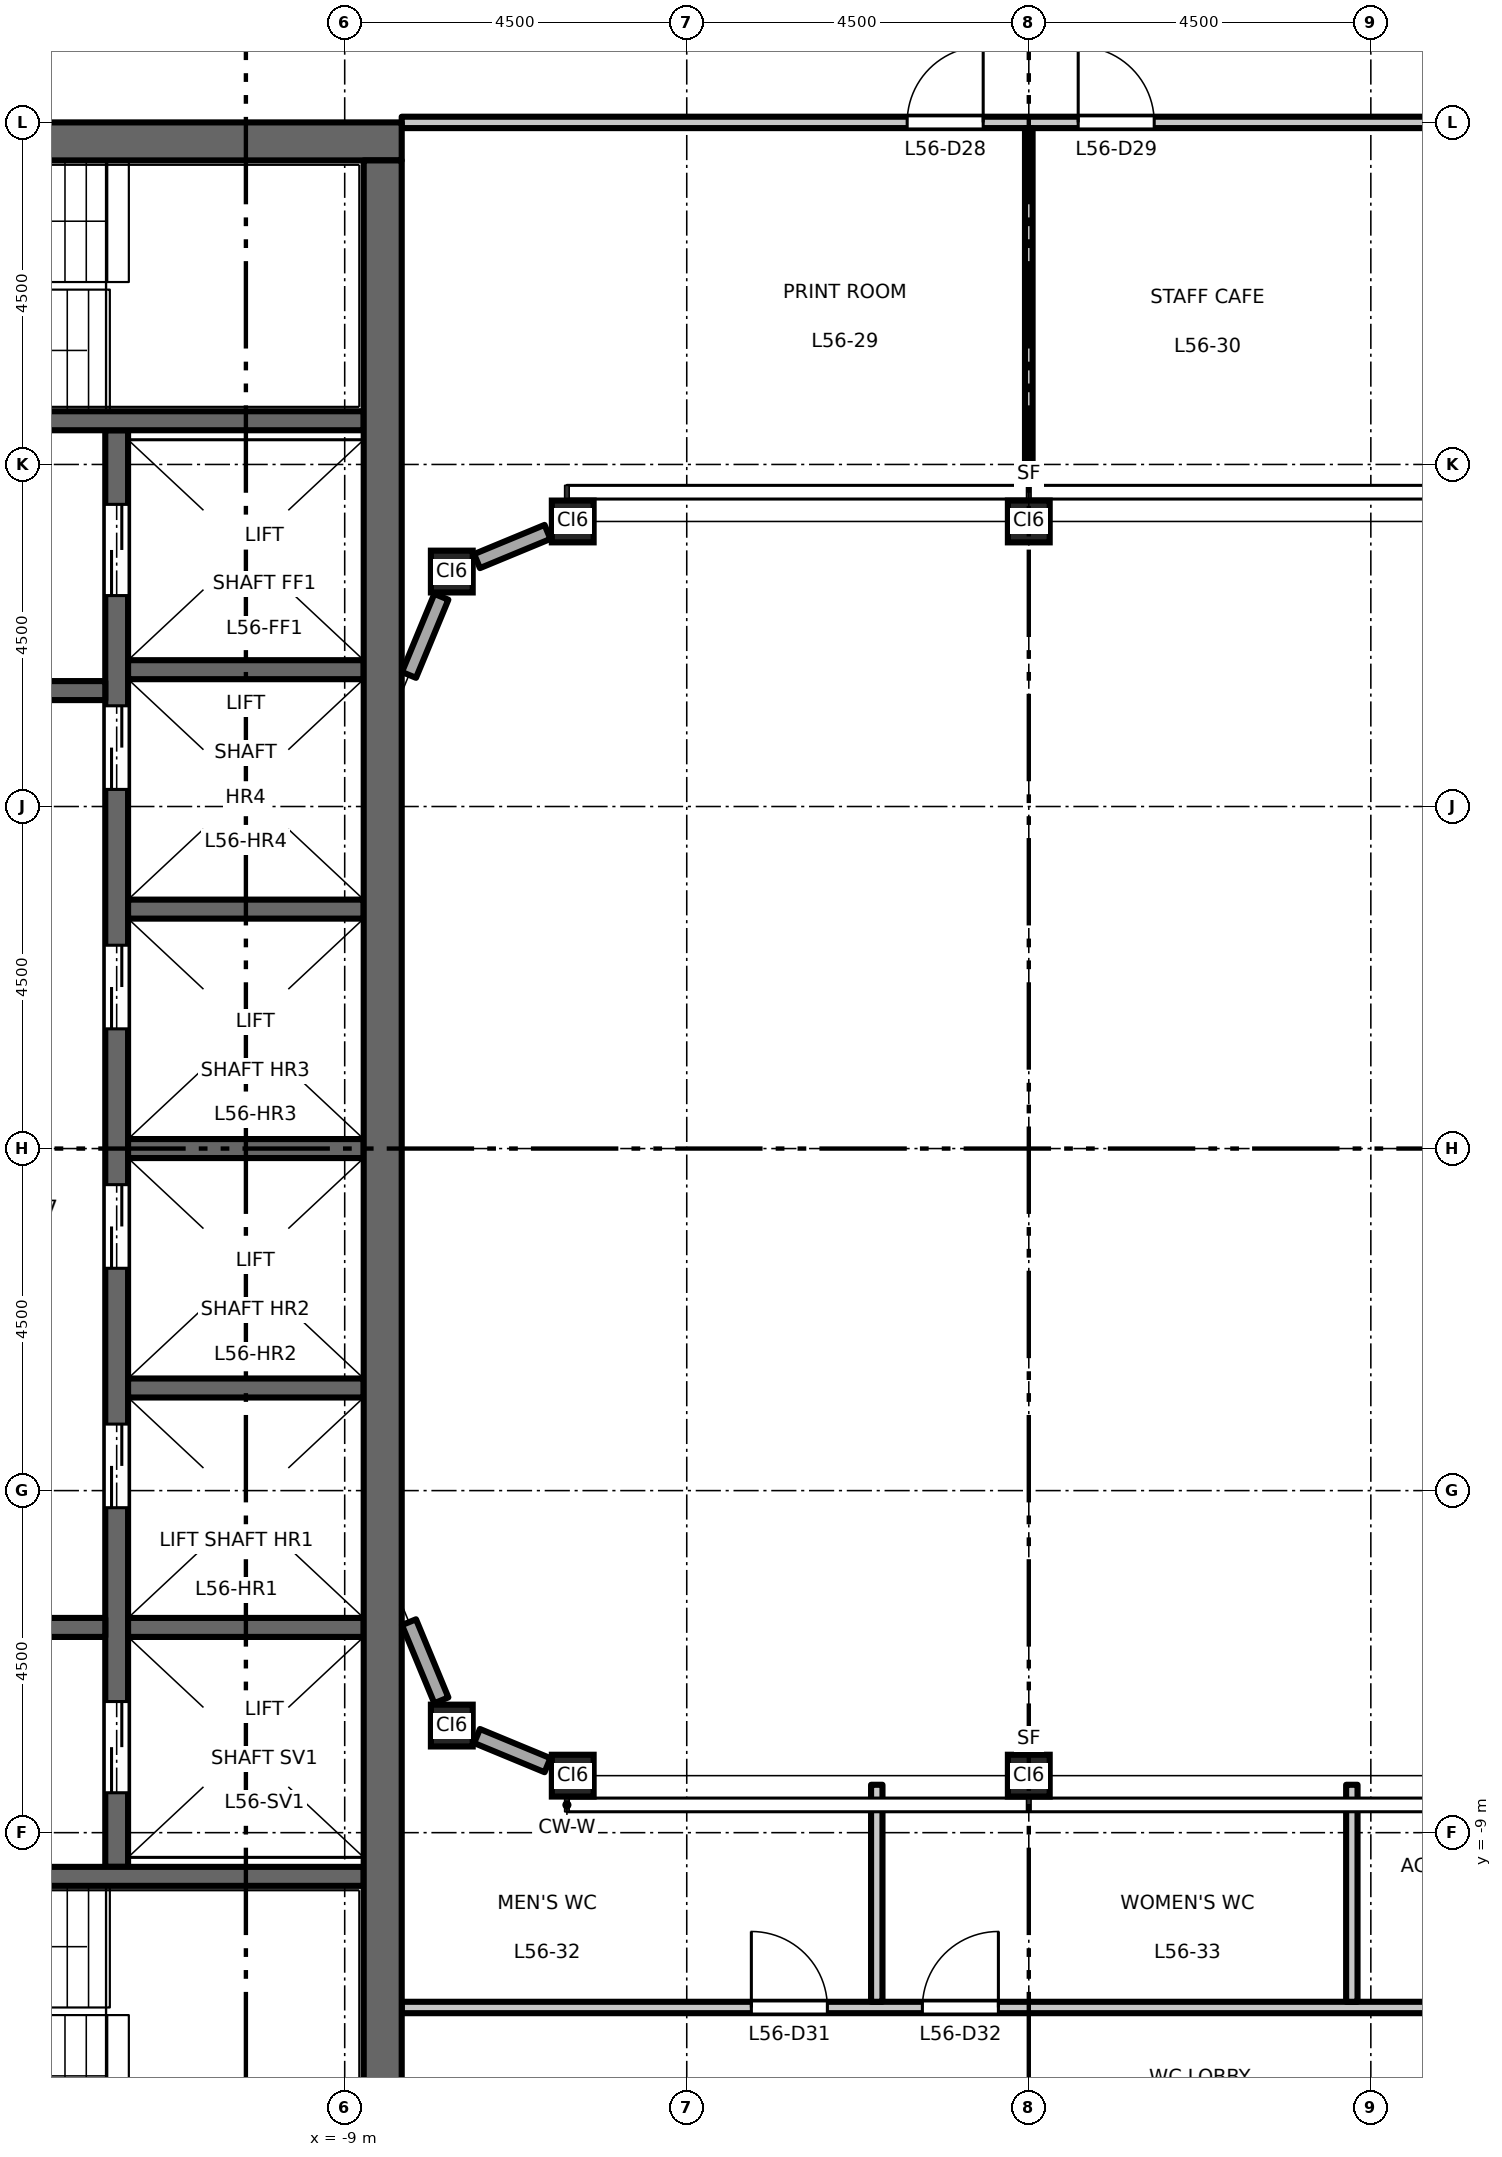
"""IFC4 building model, lengths in metres.
Left out: names, types, materials, properties, quantities, classifications, styles, units other than length and angle.
Written with IfcOpenShell. Run it as: python <this file> out.ifc"""

import sys

from ifc_helpers import new_model, si_unit, direction, frame, frame_2d, origin, origin_2d, place, context, subcontext, project, spatial, rectangle, hollow_rectangle, extrude, element, fill, save


model = new_model("IFC4")
c1 = context("Model", 3, precision=1e-05, world=origin(), true_north=direction((0.0, 1.0)))
c2 = subcontext(c1, "Body", "Model", "MODEL_VIEW")
j1 = project(units=[si_unit("LENGTHUNIT", "METRE"), si_unit("PLANEANGLEUNIT", "RADIAN")], contexts=[c1])
p1 = place(None, origin())
s1 = spatial("IfcSite", under=j1, at=p1, CompositionType="ELEMENT")
p2 = place(p1, origin())
s2 = spatial("IfcBuilding", under=s1, at=p2, CompositionType="ELEMENT")
p3 = place(p2, frame((0.0, 0.0, 260.2)))
s3 = spatial("IfcBuildingStorey", under=s2, at=p3, CompositionType="ELEMENT", Elevation=260.2)
for number, where, z_axis, x_axis in (
    (1, (-7.591, -7.591, 0.0), (0.0, 0.0, 1.0), (1.0, 0.0, 0.0)),
    (2, (-6.0, -8.25, 0.0), (0.0, 0.0, 1.0), (1.0, 0.0, 0.0)),
    (3, (0.0, -8.25, 0.0), (0.0, 0.0, 1.0), (1.0, 0.0, 0.0)),
    (4, (-7.591, 7.591, 0.0), (0.0, 0.0, 1.0), (1.0, 0.0, 0.0)),
    (5, (-6.0, 8.25, 0.0), (0.0, 0.0, 1.0), (1.0, 0.0, 0.0)),
    (6, (0.0, 8.25, 0.0), (0.0, 0.0, 1.0), (1.0, 0.0, 0.0)),
):
    element("IfcColumn", number, at=place(p3, frame(where, z_axis=z_axis, x_axis=x_axis)), inside=s3, PredefinedType="COLUMN", context=c2, shape_type="SweptSolid", body=[
        extrude(hollow_rectangle(XDim=0.55, YDim=0.55, WallThickness=0.028, at=origin_2d()), origin(), (0.0, 0.0, 1.0), 4.5),
    ])
p4 = place(p3, frame((-12.0, -9.45, 0.0), z_axis=(0.0, 0.0, 1.0), x_axis=(0.0, 1.0, 0.0)))
e7 = element("IfcWall", 7, at=p4, inside=s3, PredefinedType="SHEAR", context=c2, shape_type="SweptSolid", body=[
    extrude(rectangle(XDim=18.9, YDim=0.3, at=frame_2d((9.45, 0.0))), origin(), (0.0, 0.0, 1.0), 4.35),
])
p5 = place(p4, frame((4.725, 0.0, 0.0)))
e8 = element("IfcOpeningElement", 8, at=p5, cuts=e7, PredefinedType="OPENING", context=c2, shape_type="SweptSolid", body=[
    extrude(rectangle(XDim=1.1, YDim=2.1, at=frame_2d((0.55, 1.05))), frame((0.0, 0.16, 0.0), z_axis=(0.0, -1.0, 0.0), x_axis=(1.0, 0.0, 0.0)), (0.0, 0.0, 1.0), 0.32),
])
p6 = place(p4, frame((7.875, 0.0, 0.0)))
e9 = element("IfcOpeningElement", 9, at=p6, cuts=e7, PredefinedType="OPENING", context=c2, shape_type="SweptSolid", body=[
    extrude(rectangle(XDim=1.1, YDim=2.1, at=frame_2d((0.55, 1.05))), frame((0.0, 0.16, 0.0), z_axis=(0.0, -1.0, 0.0), x_axis=(1.0, 0.0, 0.0)), (0.0, 0.0, 1.0), 0.32),
])
p7 = place(p4, frame((11.025, 0.0, 0.0)))
e10 = element("IfcOpeningElement", 10, at=p7, cuts=e7, PredefinedType="OPENING", context=c2, shape_type="SweptSolid", body=[
    extrude(rectangle(XDim=1.1, YDim=2.1, at=frame_2d((0.55, 1.05))), frame((0.0, 0.16, 0.0), z_axis=(0.0, -1.0, 0.0), x_axis=(1.0, 0.0, 0.0)), (0.0, 0.0, 1.0), 0.32),
])
p8 = place(p4, frame((14.175, 0.0, 0.0)))
e11 = element("IfcOpeningElement", 11, at=p8, cuts=e7, PredefinedType="OPENING", context=c2, shape_type="SweptSolid", body=[
    extrude(rectangle(XDim=1.1, YDim=2.1, at=frame_2d((0.55, 1.05))), frame((0.0, 0.16, 0.0), z_axis=(0.0, -1.0, 0.0), x_axis=(1.0, 0.0, 0.0)), (0.0, 0.0, 1.0), 0.32),
])
p9 = place(p4, frame((16.725, 0.0, 0.0)))
e12 = element("IfcOpeningElement", 12, at=p9, cuts=e7, PredefinedType="OPENING", context=c2, shape_type="SweptSolid", body=[
    extrude(rectangle(XDim=1.2, YDim=2.1, at=frame_2d((0.6, 1.05))), frame((0.0, 0.16, 0.0), z_axis=(0.0, -1.0, 0.0), x_axis=(1.0, 0.0, 0.0)), (0.0, 0.0, 1.0), 0.32),
])
p10 = place(p4, frame((0.975, 0.0, 0.0)))
e13 = element("IfcOpeningElement", 13, at=p10, cuts=e7, PredefinedType="OPENING", context=c2, shape_type="SweptSolid", body=[
    extrude(rectangle(XDim=1.2, YDim=2.1, at=frame_2d((0.6, 1.05))), frame((0.0, 0.16, 0.0), z_axis=(0.0, -1.0, 0.0), x_axis=(1.0, 0.0, 0.0)), (0.0, 0.0, 1.0), 0.32),
])
p11 = place(p3, frame((-12.15, 6.025, 0.0), z_axis=(0.0, 0.0, 1.0), x_axis=(-1.0, 0.0, 0.0)))
e14 = element("IfcWall", 14, at=p11, inside=s3, PredefinedType="SHEAR", context=c2, shape_type="SweptSolid", body=[
    extrude(rectangle(XDim=4.6, YDim=0.25, at=frame_2d((2.3, 0.0))), origin(), (0.0, 0.0, 1.0), 4.35),
])
p12 = place(p11, frame((1.8, 0.0, 0.0)))
e15 = element("IfcOpeningElement", 15, at=p12, cuts=e14, PredefinedType="OPENING", context=c2, shape_type="SweptSolid", body=[
    extrude(rectangle(XDim=1.0, YDim=2.1, at=frame_2d((0.5, 1.05))), frame((0.0, 0.135, 0.0), z_axis=(0.0, -1.0, 0.0), x_axis=(1.0, 0.0, 0.0)), (0.0, 0.0, 1.0), 0.27),
])
p13 = place(p3, frame((-12.15, -6.3, 0.0), z_axis=(0.0, 0.0, 1.0), x_axis=(-1.0, 0.0, 0.0)))
e16 = element("IfcWall", 16, at=p13, inside=s3, PredefinedType="SHEAR", context=c2, shape_type="SweptSolid", body=[
    extrude(rectangle(XDim=9.1, YDim=0.25, at=frame_2d((4.55, 0.0))), origin(), (0.0, 0.0, 1.0), 4.35),
])
p14 = place(p13, frame((1.8, 0.0, 0.0)))
e17 = element("IfcOpeningElement", 17, at=p14, cuts=e16, PredefinedType="OPENING", context=c2, shape_type="SweptSolid", body=[
    extrude(rectangle(XDim=1.0, YDim=2.1, at=frame_2d((0.5, 1.05))), frame((0.0, 0.135, 0.0), z_axis=(0.0, -1.0, 0.0), x_axis=(1.0, 0.0, 0.0)), (0.0, 0.0, 1.0), 0.27),
])
for number, where, z_axis, x_axis in (
    (18, (-8.75, 0.0, 0.0), (0.0, 0.0, 1.0), (-1.0, 0.0, 0.0)),
    (19, (-8.75, 3.15, 0.0), (0.0, 0.0, 1.0), (-1.0, 0.0, 0.0)),
    (20, (-8.75, 6.3, 0.0), (0.0, 0.0, 1.0), (-1.0, 0.0, 0.0)),
    (21, (-8.75, -3.15, 0.0), (0.0, 0.0, 1.0), (-1.0, 0.0, 0.0)),
    (22, (-8.75, -6.3, 0.0), (0.0, 0.0, 1.0), (-1.0, 0.0, 0.0)),
):
    element("IfcWall", number, at=place(p3, frame(where, z_axis=z_axis, x_axis=x_axis)), inside=s3, PredefinedType="SHEAR", context=c2, shape_type="SweptSolid", body=[
        extrude(rectangle(XDim=3.1, YDim=0.25, at=frame_2d((1.55, 0.0))), origin(), (0.0, 0.0, 1.0), 4.35),
    ])
p15 = place(p3, frame((-8.75, 9.575, 0.0), z_axis=(0.0, 0.0, 1.0), x_axis=(-1.0, 0.0, 0.0)))
e23 = element("IfcWall", 23, at=p15, inside=s3, PredefinedType="SHEAR", context=c2, shape_type="SweptSolid", body=[
    extrude(rectangle(XDim=8.0, YDim=0.25, at=frame_2d((4.0, 0.0))), origin(), (0.0, 0.0, 1.0), 4.35),
])
p16 = place(p15, frame((6.65, 0.0, 0.0)))
e24 = element("IfcOpeningElement", 24, at=p16, cuts=e23, PredefinedType="OPENING", context=c2, shape_type="SweptSolid", body=[
    extrude(rectangle(XDim=1.1, YDim=2.1, at=frame_2d((0.55, 1.05))), frame((0.0, 0.135, 0.0), z_axis=(0.0, -1.0, 0.0), x_axis=(1.0, 0.0, 0.0)), (0.0, 0.0, 1.0), 0.27),
])
p17 = place(p3, frame((-8.75, -9.575, 0.0), z_axis=(0.0, 0.0, 1.0), x_axis=(-1.0, 0.0, 0.0)))
e25 = element("IfcWall", 25, at=p17, inside=s3, PredefinedType="SHEAR", context=c2, shape_type="SweptSolid", body=[
    extrude(rectangle(XDim=8.0, YDim=0.25, at=frame_2d((4.0, 0.0))), origin(), (0.0, 0.0, 1.0), 4.35),
])
p18 = place(p17, frame((6.65, 0.0, 0.0)))
e26 = element("IfcOpeningElement", 26, at=p18, cuts=e25, PredefinedType="OPENING", context=c2, shape_type="SweptSolid", body=[
    extrude(rectangle(XDim=1.1, YDim=2.1, at=frame_2d((0.55, 1.05))), frame((0.0, 0.135, 0.0), z_axis=(0.0, -1.0, 0.0), x_axis=(1.0, 0.0, 0.0)), (0.0, 0.0, 1.0), 0.27),
])
p19 = place(p3, frame((-8.25, 13.25, 0.0), z_axis=(0.0, 0.0, 1.0), x_axis=(-1.0, 0.0, 0.0)))
e27 = element("IfcWall", 27, at=p19, inside=s3, PredefinedType="SHEAR", context=c2, shape_type="SweptSolid", body=[
    extrude(rectangle(XDim=13.5, YDim=0.5, at=frame_2d((6.75, 0.0))), origin(), (0.0, 0.0, 1.0), 4.35),
])
p20 = place(p3, frame((-8.5, -13.0, 0.0), z_axis=(0.0, 0.0, 1.0), x_axis=(0.0, 1.0, 0.0)))
e28 = element("IfcWall", 28, at=p20, inside=s3, PredefinedType="SHEAR", context=c2, shape_type="SweptSolid", body=[
    extrude(rectangle(XDim=26.0, YDim=0.5, at=frame_2d((13.0, 0.0))), origin(), (0.0, 0.0, 1.0), 4.35),
])
p21 = place(p3, frame((-6.332, 8.113, 0.0), z_axis=(0.0, 0.0, 1.0), x_axis=(-0.923859650767, -0.382731427616, 0.0)))
e29 = element("IfcWall", 29, at=p21, inside=s3, PredefinedType="STANDARD", context=c2, shape_type="SweptSolid", body=[
    extrude(rectangle(XDim=1.003, YDim=0.2, at=frame_2d((0.502, 0.0))), origin(), (0.0, 0.0, 1.0), 3.918),
])
for number, where, z_axis, x_axis in (
    (30, (-7.729, 7.259, 0.0), (0.0, 0.0, 1.0), (-0.383, -0.924, 0.0)),
    (31, (-8.154, -6.231, 0.0), (0.0, 0.0, 1.0), (0.383, -0.924, 0.0)),
):
    element("IfcWall", number, at=place(p3, frame(where, z_axis=z_axis, x_axis=x_axis)), inside=s3, PredefinedType="STANDARD", context=c2, shape_type="SweptSolid", body=[
        extrude(rectangle(XDim=1.113, YDim=0.2, at=frame_2d((0.556, 0.0))), origin(), (0.0, 0.0, 1.0), 3.918),
    ])
p22 = place(p3, frame((-7.259, -7.729, 0.0), z_axis=(0.0, 0.0, 1.0), x_axis=(0.923859650767, -0.382731427616, 0.0)))
e32 = element("IfcWall", 32, at=p22, inside=s3, PredefinedType="STANDARD", context=c2, shape_type="SweptSolid", body=[
    extrude(rectangle(XDim=1.003, YDim=0.2, at=frame_2d((0.502, 0.0))), origin(), (0.0, 0.0, 1.0), 3.918),
])
p23 = place(p3, frame((-8.25, -11.3, 0.0), z_axis=(0.0, 0.0, 1.0), x_axis=(1.0, 0.0, 0.0)))
e33 = element("IfcWall", 33, at=p23, inside=s3, PredefinedType="PARTITIONING", context=c2, shape_type="SweptSolid", body=[
    extrude(rectangle(XDim=15.17, YDim=0.15, at=frame_2d((7.585, 0.0))), origin(), (0.0, 0.0, 1.0), 4.35),
])
p24 = place(p23, frame((4.6, 0.0, 0.0)))
e34 = element("IfcOpeningElement", 34, at=p24, cuts=e33, PredefinedType="OPENING", context=c2, shape_type="SweptSolid", body=[
    extrude(rectangle(XDim=1.0, YDim=2.1, at=frame_2d((0.5, 1.05))), frame((0.0, 0.085, 0.0), z_axis=(0.0, -1.0, 0.0), x_axis=(1.0, 0.0, 0.0)), (0.0, 0.0, 1.0), 0.17),
])
p25 = place(p23, frame((6.85, 0.0, 0.0)))
e35 = element("IfcOpeningElement", 35, at=p25, cuts=e33, PredefinedType="OPENING", context=c2, shape_type="SweptSolid", body=[
    extrude(rectangle(XDim=1.0, YDim=2.1, at=frame_2d((0.5, 1.05))), frame((0.0, 0.085, 0.0), z_axis=(0.0, -1.0, 0.0), x_axis=(1.0, 0.0, 0.0)), (0.0, 0.0, 1.0), 0.17),
])
p26 = place(p23, frame((13.52, 0.0, 0.0)))
e36 = element("IfcOpeningElement", 36, at=p26, cuts=e33, PredefinedType="OPENING", context=c2, shape_type="SweptSolid", body=[
    extrude(rectangle(XDim=1.0, YDim=2.1, at=frame_2d((0.5, 1.05))), frame((0.0, 0.085, 0.0), z_axis=(0.0, -1.0, 0.0), x_axis=(1.0, 0.0, 0.0)), (0.0, 0.0, 1.0), 0.17),
])
p27 = place(p3, frame((-8.25, 13.5, 0.0), z_axis=(0.0, 0.0, 1.0), x_axis=(1.0, 0.0, 0.0)))
e37 = element("IfcWall", 37, at=p27, inside=s3, PredefinedType="PARTITIONING", context=c2, shape_type="SweptSolid", body=[
    extrude(rectangle(XDim=16.5, YDim=0.15, at=frame_2d((8.25, 0.0))), origin(), (0.0, 0.0, 1.0), 4.35),
])
p28 = place(p27, frame((6.65, 0.0, 0.0)))
e38 = element("IfcOpeningElement", 38, at=p28, cuts=e37, PredefinedType="OPENING", context=c2, shape_type="SweptSolid", body=[
    extrude(rectangle(XDim=1.0, YDim=2.1, at=frame_2d((0.5, 1.05))), frame((0.0, 0.085, 0.0), z_axis=(0.0, -1.0, 0.0), x_axis=(1.0, 0.0, 0.0)), (0.0, 0.0, 1.0), 0.17),
])
p29 = place(p27, frame((8.9, 0.0, 0.0)))
e39 = element("IfcOpeningElement", 39, at=p29, cuts=e37, PredefinedType="OPENING", context=c2, shape_type="SweptSolid", body=[
    extrude(rectangle(XDim=1.0, YDim=2.1, at=frame_2d((0.5, 1.05))), frame((0.0, 0.085, 0.0), z_axis=(0.0, -1.0, 0.0), x_axis=(1.0, 0.0, 0.0)), (0.0, 0.0, 1.0), 0.17),
])
p30 = place(p3, frame((-2.0, -11.225, 0.0), z_axis=(0.0, 0.0, 1.0), x_axis=(0.0, 1.0, 0.0)))
e40 = element("IfcWall", 40, at=p30, inside=s3, PredefinedType="PARTITIONING", context=c2, shape_type="SweptSolid", body=[
    extrude(rectangle(XDim=2.855, YDim=0.15, at=frame_2d((1.427, 0.0))), origin(), (0.0, 0.0, 1.0), 4.35),
])
p31 = place(p3, frame((0.0, 8.6, 0.0), z_axis=(0.0, 0.0, 1.0), x_axis=(0.0, 1.0, 0.0)))
e41 = element("IfcWall", 41, at=p31, inside=s3, PredefinedType="PARTITIONING", context=c2, shape_type="SweptSolid", body=[
    extrude(rectangle(XDim=4.825, YDim=0.1, at=frame_2d((2.413, 0.0))), origin(), (0.0, 0.0, 1.0), 3.55),
])
p32 = place(p3, frame((4.25, -11.225, 0.0), z_axis=(0.0, 0.0, 1.0), x_axis=(0.0, 1.0, 0.0)))
e42 = element("IfcWall", 42, at=p32, inside=s3, PredefinedType="PARTITIONING", context=c2, shape_type="SweptSolid", body=[
    extrude(rectangle(XDim=2.855, YDim=0.15, at=frame_2d((1.427, 0.0))), origin(), (0.0, 0.0, 1.0), 4.35),
])
p33 = place(p5, origin())
e43 = element("IfcDoor", 43, at=p33, inside=s3, OperationType="DOUBLE_DOOR_SLIDING", PredefinedType="DOOR", context=c2, shape_type="SweptSolid", body=[
    extrude(rectangle(XDim=1.1, YDim=2.1, at=frame_2d((0.55, 1.05))), frame((0.0, 0.025, 0.0), z_axis=(0.0, -1.0, 0.0), x_axis=(1.0, 0.0, 0.0)), (0.0, 0.0, 1.0), 0.05),
])
fill(e8, e43)
p34 = place(p6, origin())
e44 = element("IfcDoor", 44, at=p34, inside=s3, OperationType="DOUBLE_DOOR_SLIDING", PredefinedType="DOOR", context=c2, shape_type="SweptSolid", body=[
    extrude(rectangle(XDim=1.1, YDim=2.1, at=frame_2d((0.55, 1.05))), frame((0.0, 0.025, 0.0), z_axis=(0.0, -1.0, 0.0), x_axis=(1.0, 0.0, 0.0)), (0.0, 0.0, 1.0), 0.05),
])
fill(e9, e44)
p35 = place(p7, origin())
e45 = element("IfcDoor", 45, at=p35, inside=s3, OperationType="DOUBLE_DOOR_SLIDING", PredefinedType="DOOR", context=c2, shape_type="SweptSolid", body=[
    extrude(rectangle(XDim=1.1, YDim=2.1, at=frame_2d((0.55, 1.05))), frame((0.0, 0.025, 0.0), z_axis=(0.0, -1.0, 0.0), x_axis=(1.0, 0.0, 0.0)), (0.0, 0.0, 1.0), 0.05),
])
fill(e10, e45)
p36 = place(p8, origin())
e46 = element("IfcDoor", 46, at=p36, inside=s3, OperationType="DOUBLE_DOOR_SLIDING", PredefinedType="DOOR", context=c2, shape_type="SweptSolid", body=[
    extrude(rectangle(XDim=1.1, YDim=2.1, at=frame_2d((0.55, 1.05))), frame((0.0, 0.025, 0.0), z_axis=(0.0, -1.0, 0.0), x_axis=(1.0, 0.0, 0.0)), (0.0, 0.0, 1.0), 0.05),
])
fill(e11, e46)
p37 = place(p9, origin())
e47 = element("IfcDoor", 47, at=p37, inside=s3, OperationType="DOUBLE_DOOR_SLIDING", PredefinedType="DOOR", context=c2, shape_type="SweptSolid", body=[
    extrude(rectangle(XDim=1.2, YDim=2.1, at=frame_2d((0.6, 1.05))), frame((0.0, 0.025, 0.0), z_axis=(0.0, -1.0, 0.0), x_axis=(1.0, 0.0, 0.0)), (0.0, 0.0, 1.0), 0.05),
])
fill(e12, e47)
p38 = place(p10, origin())
e48 = element("IfcDoor", 48, at=p38, inside=s3, OperationType="DOUBLE_DOOR_SLIDING", PredefinedType="DOOR", context=c2, shape_type="SweptSolid", body=[
    extrude(rectangle(XDim=1.2, YDim=2.1, at=frame_2d((0.6, 1.05))), frame((0.0, 0.025, 0.0), z_axis=(0.0, -1.0, 0.0), x_axis=(1.0, 0.0, 0.0)), (0.0, 0.0, 1.0), 0.05),
])
fill(e13, e48)
p39 = place(p28, origin())
e49 = element("IfcDoor", 49, at=p39, inside=s3, OperationType="SINGLE_SWING_RIGHT", PredefinedType="DOOR", context=c2, shape_type="SweptSolid", body=[
    extrude(rectangle(XDim=1.0, YDim=2.1, at=frame_2d((0.5, 1.05))), frame((0.0, 0.025, 0.0), z_axis=(0.0, -1.0, 0.0), x_axis=(1.0, 0.0, 0.0)), (0.0, 0.0, 1.0), 0.05),
])
fill(e38, e49)
p40 = place(p29, origin())
e50 = element("IfcDoor", 50, at=p40, inside=s3, OperationType="SINGLE_SWING_LEFT", PredefinedType="DOOR", context=c2, shape_type="SweptSolid", body=[
    extrude(rectangle(XDim=1.0, YDim=2.1, at=frame_2d((0.5, 1.05))), frame((0.0, 0.025, 0.0), z_axis=(0.0, -1.0, 0.0), x_axis=(1.0, 0.0, 0.0)), (0.0, 0.0, 1.0), 0.05),
])
fill(e39, e50)
p41 = place(p24, origin())
e51 = element("IfcDoor", 51, at=p41, inside=s3, OperationType="SINGLE_SWING_LEFT", PredefinedType="DOOR", context=c2, shape_type="SweptSolid", body=[
    extrude(rectangle(XDim=1.0, YDim=2.1, at=frame_2d((0.5, 1.05))), frame((0.0, 0.025, 0.0), z_axis=(0.0, -1.0, 0.0), x_axis=(1.0, 0.0, 0.0)), (0.0, 0.0, 1.0), 0.05),
])
fill(e34, e51)
p42 = place(p25, origin())
e52 = element("IfcDoor", 52, at=p42, inside=s3, OperationType="SINGLE_SWING_RIGHT", PredefinedType="DOOR", context=c2, shape_type="SweptSolid", body=[
    extrude(rectangle(XDim=1.0, YDim=2.1, at=frame_2d((0.5, 1.05))), frame((0.0, 0.025, 0.0), z_axis=(0.0, -1.0, 0.0), x_axis=(1.0, 0.0, 0.0)), (0.0, 0.0, 1.0), 0.05),
])
fill(e35, e52)
save(model, sys.argv[1])
